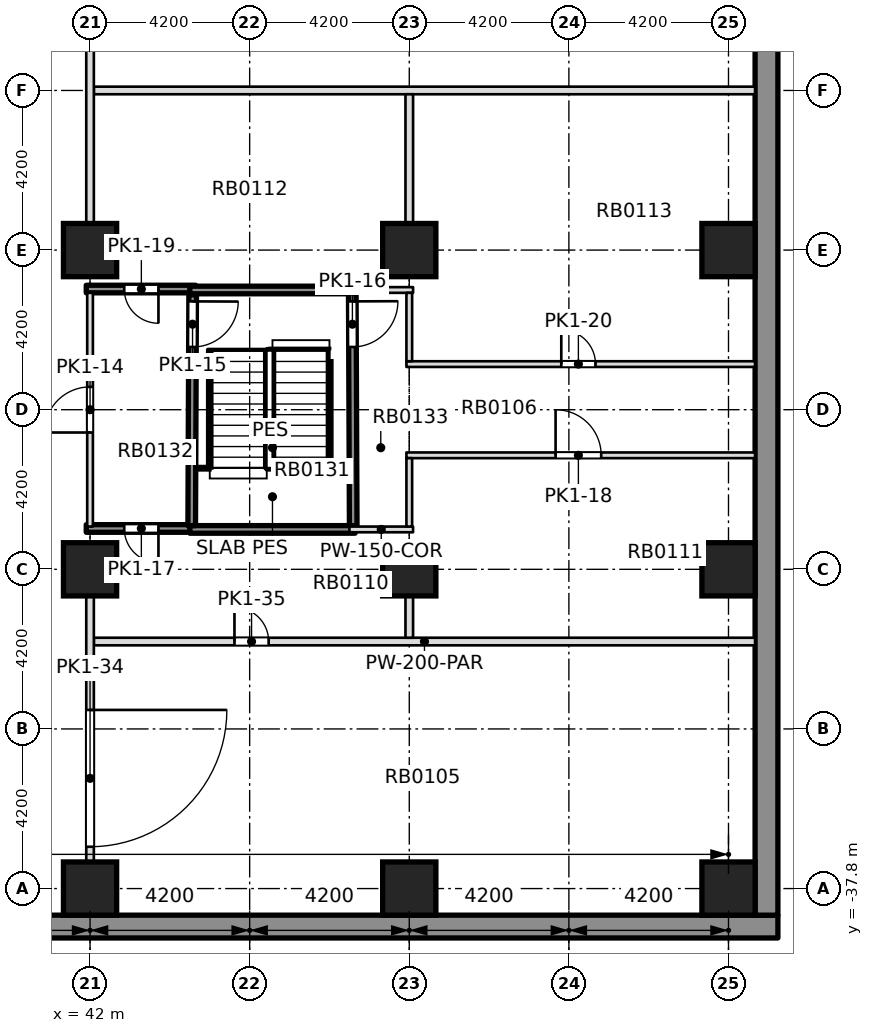
"""IFC4 building model, lengths in metres.
Left out: names, types, materials, properties, quantities, classifications, styles, units other than length and angle.
Written with IfcOpenShell. Run it as: python <this file> out.ifc"""

import sys

from ifc_helpers import new_model, si_unit, direction, frame, frame_2d, origin, origin_2d, place, context, subcontext, project, spatial, rectangle, extrude, element, fill, save


model = new_model("IFC4")
c1 = context("Model", 3, precision=1e-05, world=origin(), true_north=direction((0.0, 1.0)))
c2 = subcontext(c1, "Body", "Model", "MODEL_VIEW")
j1 = project(units=[si_unit("LENGTHUNIT", "METRE"), si_unit("PLANEANGLEUNIT", "RADIAN")], contexts=[c1])
p1 = place(None, origin())
s1 = spatial("IfcSite", under=j1, at=p1, CompositionType="ELEMENT")
p2 = place(p1, origin())
s2 = spatial("IfcBuilding", under=s1, at=p2, CompositionType="ELEMENT")
p3 = place(p2, frame((0.0, 0.0, -4.2)))
s3 = spatial("IfcBuildingStorey", under=s2, at=p3, CompositionType="ELEMENT", Elevation=-4.2)
p4 = place(p3, frame((-34.5, -38.8, 0.0), z_axis=(0.0, 0.0, 1.0), x_axis=(1.0, 0.0, 0.0)))
e1 = element("IfcWall", 1, at=p4, inside=s3, PredefinedType="SOLIDWALL", context=c2, shape_type="SweptSolid", body=[
    extrude(rectangle(XDim=94.6, YDim=0.6, at=frame_2d((47.3, 0.0))), origin(), (0.0, 0.0, 1.0), 4.2),
])
p5 = place(p3, frame((59.8, -38.5, 0.0), z_axis=(0.0, 0.0, 1.0), x_axis=(0.0, 1.0, 0.0)))
e2 = element("IfcWall", 2, at=p5, inside=s3, PredefinedType="SOLIDWALL", context=c2, shape_type="SweptSolid", body=[
    extrude(rectangle(XDim=77.0, YDim=0.6, at=frame_2d((38.5, 0.0))), origin(), (0.0, 0.0, 1.0), 4.2),
])
for number, where, z_axis, x_axis in (
    (3, (42.0, -37.8, 0.0), (0.0, 0.0, 1.0), (1.0, 0.0, 0.0)),
    (4, (50.4, -37.8, 0.0), (0.0, 0.0, 1.0), (1.0, 0.0, 0.0)),
    (5, (58.8, -37.8, 0.0), (0.0, 0.0, 1.0), (1.0, 0.0, 0.0)),
):
    element("IfcColumn", number, at=place(p3, frame(where, z_axis=z_axis, x_axis=x_axis)), inside=s3, PredefinedType="COLUMN", context=c2, shape_type="SweptSolid", body=[
        extrude(rectangle(XDim=1.4, YDim=1.4, at=origin_2d()), origin(), (0.0, 0.0, 1.0), 3.75),
    ])
for number, where, z_axis, x_axis in (
    (6, (42.0, -29.4, 0.0), (0.0, 0.0, 1.0), (1.0, 0.0, 0.0)),
    (7, (50.4, -29.4, 0.0), (0.0, 0.0, 1.0), (1.0, 0.0, 0.0)),
    (8, (58.8, -29.4, 0.0), (0.0, 0.0, 1.0), (1.0, 0.0, 0.0)),
    (9, (42.0, -21.0, 0.0), (0.0, 0.0, 1.0), (1.0, 0.0, 0.0)),
    (10, (50.4, -21.0, 0.0), (0.0, 0.0, 1.0), (1.0, 0.0, 0.0)),
    (11, (58.8, -21.0, 0.0), (0.0, 0.0, 1.0), (1.0, 0.0, 0.0)),
):
    element("IfcColumn", number, at=place(p3, frame(where, z_axis=z_axis, x_axis=x_axis)), inside=s3, PredefinedType="COLUMN", context=c2, shape_type="SweptSolid", body=[
        extrude(rectangle(XDim=1.4, YDim=1.4, at=origin_2d()), origin(), (0.0, 0.0, 1.0), 4.2),
    ])
p6 = place(p3, frame((42.1, -31.3, 0.0), z_axis=(0.0, 0.0, 1.0), x_axis=(1.0, 0.0, 0.0)))
e12 = element("IfcWall", 12, at=p6, inside=s3, PredefinedType="PARTITIONING", context=c2, shape_type="SweptSolid", body=[
    extrude(rectangle(XDim=17.399, YDim=0.2, at=frame_2d((8.699, 0.0))), origin(), (0.0, 0.0, 1.0), 3.75),
])
p7 = place(p6, frame((3.7, 0.0, 0.0)))
e13 = element("IfcOpeningElement", 13, at=p7, cuts=e12, PredefinedType="OPENING", context=c2, shape_type="SweptSolid", body=[
    extrude(rectangle(XDim=0.9, YDim=2.1, at=frame_2d((0.45, 1.05))), frame((0.0, 0.11, 0.0), z_axis=(0.0, -1.0, 0.0), x_axis=(1.0, 0.0, 0.0)), (0.0, 0.0, 1.0), 0.22),
])
p8 = place(p3, frame((41.9, -28.325, 0.0), z_axis=(0.0, 0.0, 1.0), x_axis=(1.0, 0.0, 0.0)))
e14 = element("IfcWall", 14, at=p8, inside=s3, PredefinedType="SOLIDWALL", context=c2, shape_type="SweptSolid", body=[
    extrude(rectangle(XDim=2.875, YDim=0.2, at=frame_2d((1.438, 0.0))), origin(), (0.0, 0.0, 1.0), 3.75),
])
p9 = place(p8, frame((1.0, 0.0, 0.0)))
e15 = element("IfcOpeningElement", 15, at=p9, cuts=e14, PredefinedType="OPENING", context=c2, shape_type="SweptSolid", body=[
    extrude(rectangle(XDim=0.9, YDim=2.1, at=frame_2d((0.45, 1.05))), frame((0.0, 0.11, 0.0), z_axis=(0.0, -1.0, 0.0), x_axis=(1.0, 0.0, 0.0)), (0.0, 0.0, 1.0), 0.22),
])
p10 = place(p3, frame((44.625, -28.35, 0.0), z_axis=(0.0, 0.0, 1.0), x_axis=(1.0, 0.0, 0.0)))
e16 = element("IfcWall", 16, at=p10, inside=s3, PredefinedType="SOLIDWALL", context=c2, shape_type="SweptSolid", body=[
    extrude(rectangle(XDim=4.35, YDim=0.2, at=frame_2d((2.175, 0.0))), origin(), (0.0, 0.0, 1.0), 3.75),
])
p11 = place(p3, frame((48.825, -28.35, 0.0), z_axis=(0.0, 0.0, 1.0), x_axis=(1.0, 0.0, 0.0)))
e17 = element("IfcWall", 17, at=p11, inside=s3, PredefinedType="PARTITIONING", context=c2, shape_type="SweptSolid", body=[
    extrude(rectangle(XDim=1.675, YDim=0.15, at=frame_2d((0.837, 0.0))), origin(), (0.0, 0.0, 1.0), 3.75),
])
p12 = place(p3, frame((50.325, -26.4, 0.0), z_axis=(0.0, 0.0, 1.0), x_axis=(1.0, 0.0, 0.0)))
e18 = element("IfcWall", 18, at=p12, inside=s3, PredefinedType="PARTITIONING", context=c2, shape_type="SweptSolid", body=[
    extrude(rectangle(XDim=9.174, YDim=0.15, at=frame_2d((4.587, 0.0))), origin(), (0.0, 0.0, 1.0), 3.75),
])
p13 = place(p12, frame((3.925, 0.0, 0.0)))
e19 = element("IfcOpeningElement", 19, at=p13, cuts=e18, PredefinedType="OPENING", context=c2, shape_type="SweptSolid", body=[
    extrude(rectangle(XDim=1.2, YDim=2.1, at=frame_2d((0.6, 1.05))), frame((0.0, 0.085, 0.0), z_axis=(0.0, -1.0, 0.0), x_axis=(1.0, 0.0, 0.0)), (0.0, 0.0, 1.0), 0.17),
])
p14 = place(p3, frame((50.325, -24.0, 0.0), z_axis=(0.0, 0.0, 1.0), x_axis=(1.0, 0.0, 0.0)))
e20 = element("IfcWall", 20, at=p14, inside=s3, PredefinedType="PARTITIONING", context=c2, shape_type="SweptSolid", body=[
    extrude(rectangle(XDim=9.174, YDim=0.15, at=frame_2d((4.587, 0.0))), origin(), (0.0, 0.0, 1.0), 3.75),
])
p15 = place(p14, frame((4.075, 0.0, 0.0)))
e21 = element("IfcOpeningElement", 21, at=p15, cuts=e20, PredefinedType="OPENING", context=c2, shape_type="SweptSolid", body=[
    extrude(rectangle(XDim=0.9, YDim=2.1, at=frame_2d((0.45, 1.05))), frame((0.0, 0.085, 0.0), z_axis=(0.0, -1.0, 0.0), x_axis=(1.0, 0.0, 0.0)), (0.0, 0.0, 1.0), 0.17),
])
p16 = place(p3, frame((41.9, -22.025, 0.0), z_axis=(0.0, 0.0, 1.0), x_axis=(1.0, 0.0, 0.0)))
e22 = element("IfcWall", 22, at=p16, inside=s3, PredefinedType="SOLIDWALL", context=c2, shape_type="SweptSolid", body=[
    extrude(rectangle(XDim=2.875, YDim=0.2, at=frame_2d((1.438, 0.0))), origin(), (0.0, 0.0, 1.0), 3.75),
])
p17 = place(p16, frame((1.0, 0.0, 0.0)))
e23 = element("IfcOpeningElement", 23, at=p17, cuts=e22, PredefinedType="OPENING", context=c2, shape_type="SweptSolid", body=[
    extrude(rectangle(XDim=0.9, YDim=2.1, at=frame_2d((0.45, 1.05))), frame((0.0, 0.11, 0.0), z_axis=(0.0, -1.0, 0.0), x_axis=(1.0, 0.0, 0.0)), (0.0, 0.0, 1.0), 0.22),
])
p18 = place(p3, frame((44.625, -22.05, 0.0), z_axis=(0.0, 0.0, 1.0), x_axis=(1.0, 0.0, 0.0)))
e24 = element("IfcWall", 24, at=p18, inside=s3, PredefinedType="SOLIDWALL", context=c2, shape_type="SweptSolid", body=[
    extrude(rectangle(XDim=4.35, YDim=0.2, at=frame_2d((2.175, 0.0))), origin(), (0.0, 0.0, 1.0), 3.75),
])
p19 = place(p3, frame((48.825, -22.05, 0.0), z_axis=(0.0, 0.0, 1.0), x_axis=(1.0, 0.0, 0.0)))
e25 = element("IfcWall", 25, at=p19, inside=s3, PredefinedType="PARTITIONING", context=c2, shape_type="SweptSolid", body=[
    extrude(rectangle(XDim=1.675, YDim=0.15, at=frame_2d((0.837, 0.0))), origin(), (0.0, 0.0, 1.0), 3.75),
])
p20 = place(p3, frame((42.1, -16.8, 0.0), z_axis=(0.0, 0.0, 1.0), x_axis=(1.0, 0.0, 0.0)))
e26 = element("IfcWall", 26, at=p20, inside=s3, PredefinedType="PARTITIONING", context=c2, shape_type="SweptSolid", body=[
    extrude(rectangle(XDim=17.399, YDim=0.2, at=frame_2d((8.699, 0.0))), origin(), (0.0, 0.0, 1.0), 3.75),
])
p21 = place(p3, frame((42.0, -37.1, 0.0), z_axis=(0.0, 0.0, 1.0), x_axis=(0.0, 1.0, 0.0)))
e27 = element("IfcWall", 27, at=p21, inside=s3, PredefinedType="PARTITIONING", context=c2, shape_type="SweptSolid", body=[
    extrude(rectangle(XDim=7.0, YDim=0.2, at=frame_2d((3.5, 0.0))), origin(), (0.0, 0.0, 1.0), 3.75),
])
p22 = place(p21, frame((0.4, 0.0, 0.0)))
e28 = element("IfcOpeningElement", 28, at=p22, cuts=e27, PredefinedType="OPENING", context=c2, shape_type="SweptSolid", body=[
    extrude(rectangle(XDim=3.6, YDim=3.0, at=frame_2d((1.8, 1.5))), frame((0.0, 0.11, 0.0), z_axis=(0.0, -1.0, 0.0), x_axis=(1.0, 0.0, 0.0)), (0.0, 0.0, 1.0), 0.22),
])
p23 = place(p3, frame((42.0, -28.275, 0.0), z_axis=(0.0, 0.0, 1.0), x_axis=(0.0, 1.0, 0.0)))
e29 = element("IfcWall", 29, at=p23, inside=s3, PredefinedType="PARTITIONING", context=c2, shape_type="SweptSolid", body=[
    extrude(rectangle(XDim=6.15, YDim=0.15, at=frame_2d((3.075, 0.0))), origin(), (0.0, 0.0, 1.0), 3.75),
])
p24 = place(p23, frame((2.475, 0.0, 0.0)))
e30 = element("IfcOpeningElement", 30, at=p24, cuts=e29, PredefinedType="OPENING", context=c2, shape_type="SweptSolid", body=[
    extrude(rectangle(XDim=1.2, YDim=2.1, at=frame_2d((0.6, 1.05))), frame((0.0, 0.085, 0.0), z_axis=(0.0, -1.0, 0.0), x_axis=(1.0, 0.0, 0.0)), (0.0, 0.0, 1.0), 0.17),
])
p25 = place(p3, frame((42.0, -20.3, 0.0), z_axis=(0.0, 0.0, 1.0), x_axis=(0.0, 1.0, 0.0)))
e31 = element("IfcWall", 31, at=p25, inside=s3, PredefinedType="PARTITIONING", context=c2, shape_type="SweptSolid", body=[
    extrude(rectangle(XDim=7.0, YDim=0.2, at=frame_2d((3.5, 0.0))), origin(), (0.0, 0.0, 1.0), 3.75),
])
p26 = place(p3, frame((44.675, -28.25, 0.0), z_axis=(0.0, 0.0, 1.0), x_axis=(0.004098985015, 0.999991599126, 0.0)))
e32 = element("IfcWall", 32, at=p26, inside=s3, PredefinedType="SOLIDWALL", context=c2, shape_type="SweptSolid", body=[
    extrude(rectangle(XDim=6.075, YDim=0.2, at=frame_2d((3.038, 0.0))), origin(), (0.0, 0.0, 1.0), 3.75),
])
p27 = place(p26, frame((4.7, 0.0, 0.0)))
e33 = element("IfcOpeningElement", 33, at=p27, cuts=e32, PredefinedType="OPENING", context=c2, shape_type="SweptSolid", body=[
    extrude(rectangle(XDim=1.2, YDim=2.1, at=frame_2d((0.6, 1.05))), frame((0.0, 0.11, 0.0), z_axis=(0.0, -1.0, 0.0), x_axis=(1.0, 0.0, 0.0)), (0.0, 0.0, 1.0), 0.22),
])
p28 = place(p3, frame((48.925, -28.25, 0.0), z_axis=(0.0, 0.0, 1.0), x_axis=(-0.004065655173, 0.99999173519, 0.0)))
e34 = element("IfcWall", 34, at=p28, inside=s3, PredefinedType="SOLIDWALL", context=c2, shape_type="SweptSolid", body=[
    extrude(rectangle(XDim=6.125, YDim=0.2, at=frame_2d((3.062, 0.0))), origin(), (0.0, 0.0, 1.0), 3.75),
])
p29 = place(p28, frame((4.7, 0.0, 0.0)))
e35 = element("IfcOpeningElement", 35, at=p29, cuts=e34, PredefinedType="OPENING", context=c2, shape_type="SweptSolid", body=[
    extrude(rectangle(XDim=1.2, YDim=2.1, at=frame_2d((0.6, 1.05))), frame((0.0, 0.11, 0.0), z_axis=(0.0, -1.0, 0.0), x_axis=(1.0, 0.0, 0.0)), (0.0, 0.0, 1.0), 0.22),
])
p30 = place(p3, frame((50.4, -31.2, 0.0), z_axis=(0.0, 0.0, 1.0), x_axis=(0.0, 1.0, 0.0)))
e36 = element("IfcWall", 36, at=p30, inside=s3, PredefinedType="PARTITIONING", context=c2, shape_type="SweptSolid", body=[
    extrude(rectangle(XDim=1.1, YDim=0.2, at=frame_2d((0.55, 0.0))), origin(), (0.0, 0.0, 1.0), 3.75),
])
p31 = place(p3, frame((50.4, -28.275, 0.0), z_axis=(0.0, 0.0, 1.0), x_axis=(0.0, 1.0, 0.0)))
e37 = element("IfcWall", 37, at=p31, inside=s3, PredefinedType="PARTITIONING", context=c2, shape_type="SweptSolid", body=[
    extrude(rectangle(XDim=1.8, YDim=0.15, at=frame_2d((0.9, 0.0))), origin(), (0.0, 0.0, 1.0), 3.75),
])
p32 = place(p3, frame((50.4, -23.925, 0.0), z_axis=(0.0, 0.0, 1.0), x_axis=(0.0, 1.0, 0.0)))
e38 = element("IfcWall", 38, at=p32, inside=s3, PredefinedType="PARTITIONING", context=c2, shape_type="SweptSolid", body=[
    extrude(rectangle(XDim=1.8, YDim=0.15, at=frame_2d((0.9, 0.0))), origin(), (0.0, 0.0, 1.0), 3.75),
])
p33 = place(p3, frame((50.4, -20.3, 0.0), z_axis=(0.0, 0.0, 1.0), x_axis=(0.0, 1.0, 0.0)))
e39 = element("IfcWall", 39, at=p33, inside=s3, PredefinedType="PARTITIONING", context=c2, shape_type="SweptSolid", body=[
    extrude(rectangle(XDim=3.4, YDim=0.2, at=frame_2d((1.7, 0.0))), origin(), (0.0, 0.0, 1.0), 3.75),
])
p34 = place(p24, origin())
e40 = element("IfcDoor", 40, at=p34, inside=s3, OperationType="DOUBLE_DOOR_SINGLE_SWING", PredefinedType="DOOR", context=c2, shape_type="SweptSolid", body=[
    extrude(rectangle(XDim=1.2, YDim=2.1, at=frame_2d((0.6, 1.05))), frame((0.0, 0.025, 0.0), z_axis=(0.0, -1.0, 0.0), x_axis=(1.0, 0.0, 0.0)), (0.0, 0.0, 1.0), 0.05),
])
fill(e30, e40)
p35 = place(p27, origin())
e41 = element("IfcDoor", 41, at=p35, inside=s3, OperationType="DOUBLE_DOOR_SINGLE_SWING", PredefinedType="DOOR", context=c2, shape_type="SweptSolid", body=[
    extrude(rectangle(XDim=1.2, YDim=2.1, at=frame_2d((0.6, 1.05))), frame((0.0, 0.025, 0.0), z_axis=(0.0, -1.0, 0.0), x_axis=(1.0, 0.0, 0.0)), (0.0, 0.0, 1.0), 0.05),
])
fill(e33, e41)
p36 = place(p29, origin())
e42 = element("IfcDoor", 42, at=p36, inside=s3, OperationType="DOUBLE_DOOR_SINGLE_SWING", PredefinedType="DOOR", context=c2, shape_type="SweptSolid", body=[
    extrude(rectangle(XDim=1.2, YDim=2.1, at=frame_2d((0.6, 1.05))), frame((0.0, 0.025, 0.0), z_axis=(0.0, -1.0, 0.0), x_axis=(1.0, 0.0, 0.0)), (0.0, 0.0, 1.0), 0.05),
])
fill(e35, e42)
p37 = place(p9, origin())
e43 = element("IfcDoor", 43, at=p37, inside=s3, OperationType="SINGLE_SWING_RIGHT", PredefinedType="DOOR", context=c2, shape_type="SweptSolid", body=[
    extrude(rectangle(XDim=0.9, YDim=2.1, at=frame_2d((0.45, 1.05))), frame((0.0, 0.025, 0.0), z_axis=(0.0, -1.0, 0.0), x_axis=(1.0, 0.0, 0.0)), (0.0, 0.0, 1.0), 0.05),
])
fill(e15, e43)
p38 = place(p13, origin())
e44 = element("IfcDoor", 44, at=p38, inside=s3, OperationType="SINGLE_SWING_LEFT", PredefinedType="DOOR", context=c2, shape_type="SweptSolid", body=[
    extrude(rectangle(XDim=1.2, YDim=2.1, at=frame_2d((0.6, 1.05))), frame((0.0, 0.025, 0.0), z_axis=(0.0, -1.0, 0.0), x_axis=(1.0, 0.0, 0.0)), (0.0, 0.0, 1.0), 0.05),
])
fill(e19, e44)
p39 = place(p17, origin())
e45 = element("IfcDoor", 45, at=p39, inside=s3, OperationType="SINGLE_SWING_RIGHT", PredefinedType="DOOR", context=c2, shape_type="SweptSolid", body=[
    extrude(rectangle(XDim=0.9, YDim=2.1, at=frame_2d((0.45, 1.05))), frame((0.0, 0.025, 0.0), z_axis=(0.0, -1.0, 0.0), x_axis=(1.0, 0.0, 0.0)), (0.0, 0.0, 1.0), 0.05),
])
fill(e23, e45)
p40 = place(p15, origin())
e46 = element("IfcDoor", 46, at=p40, inside=s3, OperationType="SINGLE_SWING_LEFT", PredefinedType="DOOR", context=c2, shape_type="SweptSolid", body=[
    extrude(rectangle(XDim=0.9, YDim=2.1, at=frame_2d((0.45, 1.05))), frame((0.0, 0.025, 0.0), z_axis=(0.0, -1.0, 0.0), x_axis=(1.0, 0.0, 0.0)), (0.0, 0.0, 1.0), 0.05),
])
fill(e21, e46)
p41 = place(p22, origin())
e47 = element("IfcDoor", 47, at=p41, inside=s3, OperationType="DOUBLE_DOOR_SINGLE_SWING", PredefinedType="DOOR", context=c2, shape_type="SweptSolid", body=[
    extrude(rectangle(XDim=3.6, YDim=3.0, at=frame_2d((1.8, 1.5))), frame((0.0, 0.025, 0.0), z_axis=(0.0, -1.0, 0.0), x_axis=(1.0, 0.0, 0.0)), (0.0, 0.0, 1.0), 0.05),
])
fill(e28, e47)
p42 = place(p7, origin())
e48 = element("IfcDoor", 48, at=p42, inside=s3, OperationType="SINGLE_SWING_RIGHT", PredefinedType="DOOR", context=c2, shape_type="SweptSolid", body=[
    extrude(rectangle(XDim=0.9, YDim=2.1, at=frame_2d((0.45, 1.05))), frame((0.0, 0.025, 0.0), z_axis=(0.0, -1.0, 0.0), x_axis=(1.0, 0.0, 0.0)), (0.0, 0.0, 1.0), 0.05),
])
fill(e13, e48)
save(model, sys.argv[1])
